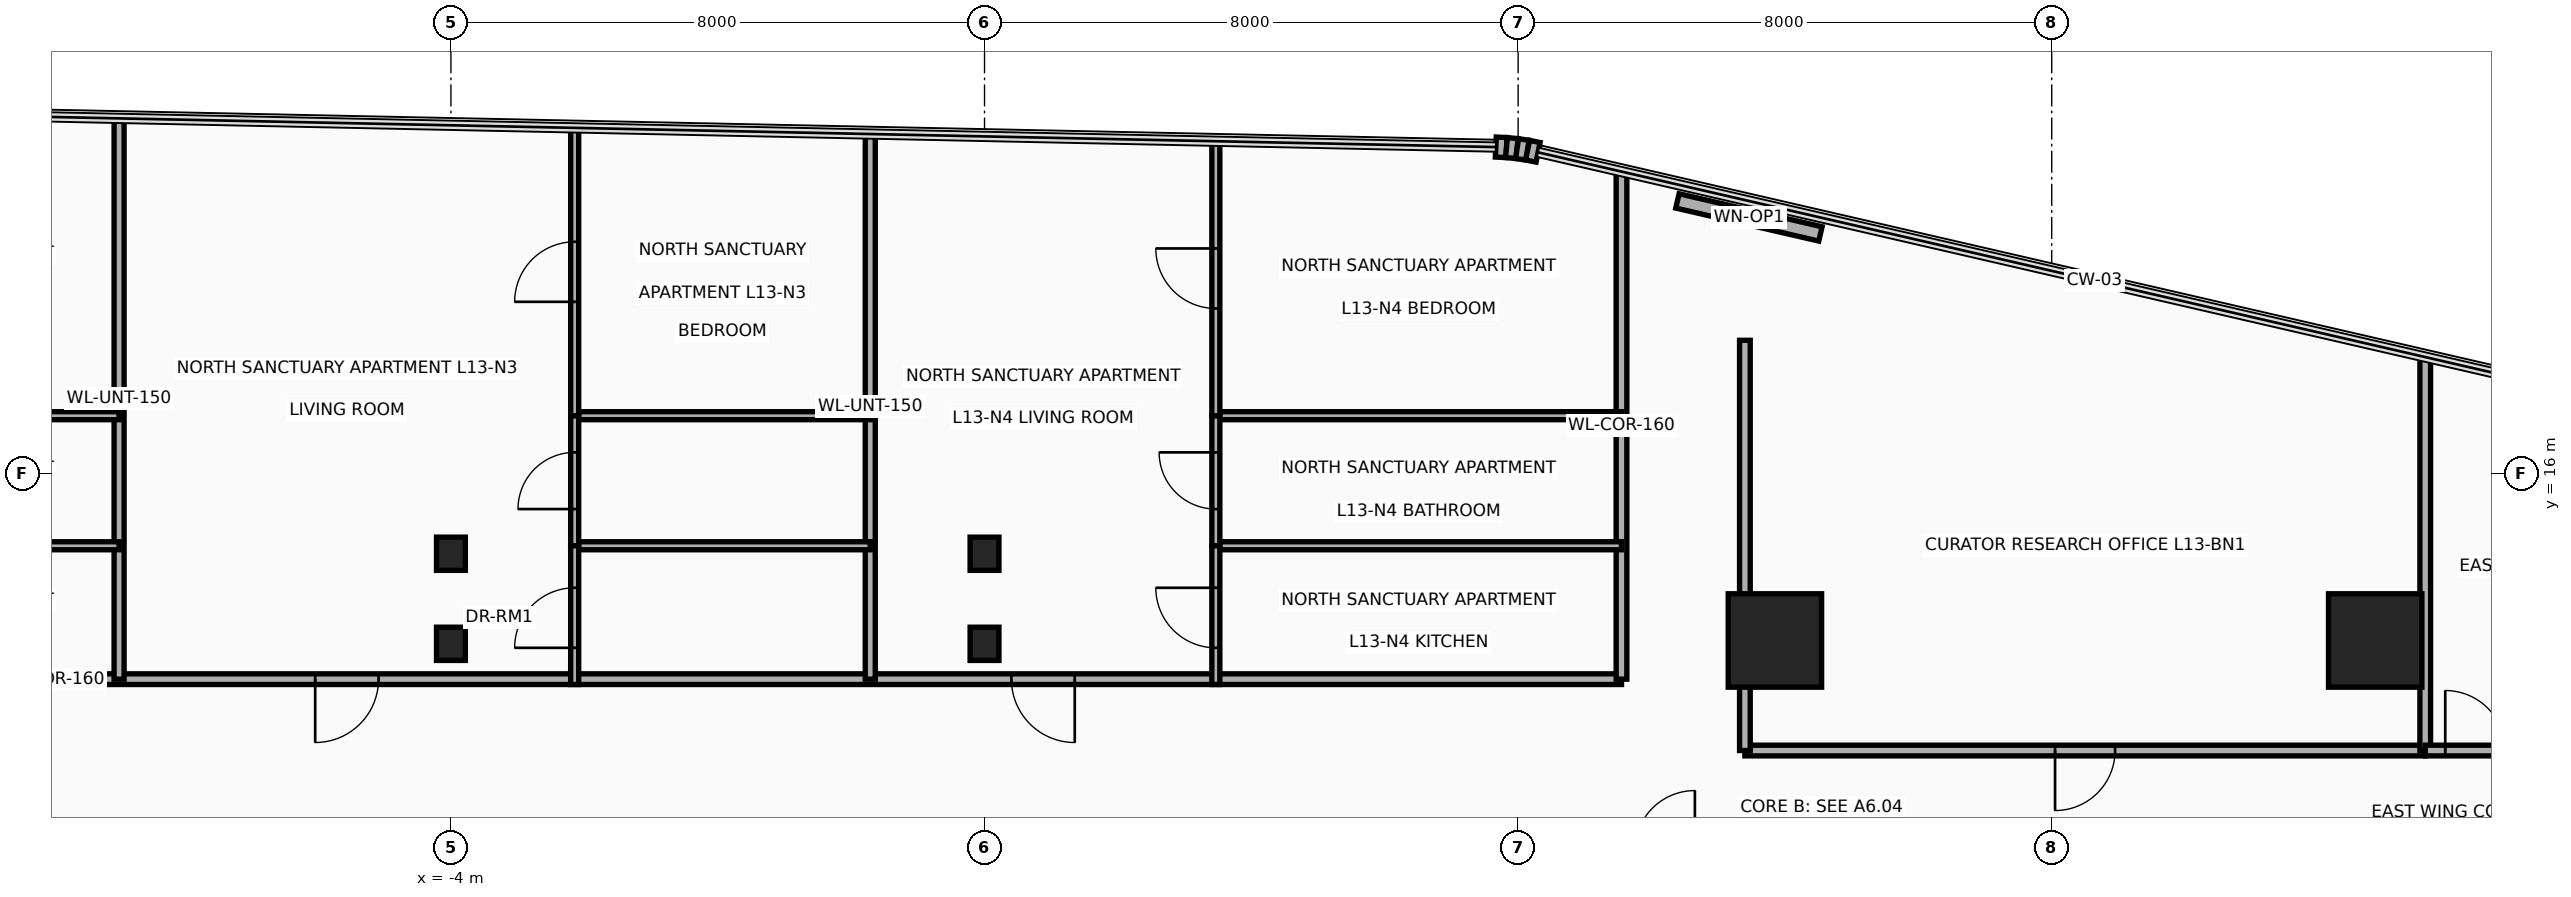
"""IFC4 building model, lengths in metres.
Left out: names, types, materials, properties, quantities, classifications, styles, units other than length and angle.
Written with IfcOpenShell. Run it as: python <this file> out.ifc"""

import sys

from ifc_helpers import new_model, si_unit, direction, frame, frame_2d, origin, origin_2d, place, context, subcontext, project, spatial, rectangle, i_section, extrude, source, transform, mapped, element, fill, save


model = new_model("IFC4")
c1 = context("Model", 3, precision=1e-05, world=origin(), true_north=direction((0.0, 1.0)))
c2 = subcontext(c1, "Body", "Model", "MODEL_VIEW")
j1 = project(units=[si_unit("LENGTHUNIT", "METRE"), si_unit("PLANEANGLEUNIT", "RADIAN")], contexts=[c1])
p1 = place(None, origin())
s1 = spatial("IfcSite", under=j1, at=p1, CompositionType="ELEMENT")
p2 = place(p1, origin())
s2 = spatial("IfcBuilding", under=s1, at=p2, CompositionType="ELEMENT")
p3 = place(p2, frame((0.0, 0.0, 55.6)))
s3 = spatial("IfcBuildingStorey", under=s2, at=p3, CompositionType="ELEMENT", Elevation=55.6)
m1 = source(origin(), c2, "Body", "SweptSolid", [
    extrude(rectangle(XDim=1.4, YDim=1.4, at=origin_2d()), origin(), (0.0, 0.0, 1.0), 3.7),
])
for number, where, z_axis, x_axis in (
    (1, (15.85, 13.5, 0.0), (0.0, 0.0, 1.0), (1.0, 0.0, 0.0)),
    (2, (24.85, 13.5, 0.0), (0.0, 0.0, 1.0), (1.0, 0.0, 0.0)),
):
    element("IfcColumn", number, at=place(p3, frame(where, z_axis=z_axis, x_axis=x_axis)), inside=s3, PredefinedType="COLUMN", context=c2, shape_type="MappedRepresentation", body=[
        mapped(m1, transform((0.0, 0.0, 0.0), x_axis=(1.0, 0.0, 0.0), y_axis=(0.0, 1.0, 0.0), z_axis=(0.0, 0.0, 1.0), scale=1.0)),
    ])
m2 = source(origin(), c2, "Body", "SweptSolid", [
    extrude(i_section(OverallWidth=0.432, OverallDepth=0.498, WebThickness=0.056, FlangeThickness=0.089, at=origin_2d()), origin(), (0.0, 0.0, 1.0), 3.7),
])
for number, where, z_axis, x_axis in (
    (3, (-4.0, 13.45, 0.0), (0.0, 0.0, 1.0), (1.0, 0.0, 0.0)),
    (4, (-4.0, 14.8, 0.0), (0.0, 0.0, 1.0), (1.0, 0.0, 0.0)),
    (5, (4.0, 13.45, 0.0), (0.0, 0.0, 1.0), (1.0, 0.0, 0.0)),
    (6, (4.0, 14.8, 0.0), (0.0, 0.0, 1.0), (1.0, 0.0, 0.0)),
):
    element("IfcColumn", number, at=place(p3, frame(where, z_axis=z_axis, x_axis=x_axis)), inside=s3, PredefinedType="COLUMN", context=c2, shape_type="MappedRepresentation", body=[
        mapped(m2, transform((0.0, 0.0, 0.0), x_axis=(1.0, 0.0, 0.0), y_axis=(0.0, 1.0, 0.0), z_axis=(0.0, 0.0, 1.0), scale=1.0)),
    ])
p4 = place(p3, frame((11.666, 20.897, 0.0), z_axis=(0.0, 0.0, 1.0), x_axis=(0.998885297239, -0.047203421059, 0.0)))
e7 = element("IfcWall", 7, at=p4, inside=s3, PredefinedType="SOLIDWALL", context=c2, shape_type="SweptSolid", body=[
    extrude(rectangle(XDim=0.16, YDim=0.3, at=frame_2d((0.08, 0.0))), origin(), (0.0, 0.0, 1.0), 3.46),
])
p5 = place(p3, frame((11.826, 20.889, 0.0), z_axis=(0.0, 0.0, 1.0), x_axis=(0.995172891136, -0.098137234257, 0.0)))
e8 = element("IfcWall", 8, at=p5, inside=s3, PredefinedType="SOLIDWALL", context=c2, shape_type="SweptSolid", body=[
    extrude(rectangle(XDim=0.159, YDim=0.3, at=frame_2d((0.08, 0.0))), origin(), (0.0, 0.0, 1.0), 3.46),
])
p6 = place(p3, frame((11.984, 20.874, 0.0), z_axis=(0.0, 0.0, 1.0), x_axis=(0.988846069207, -0.148941100486, 0.0)))
e9 = element("IfcWall", 9, at=p6, inside=s3, PredefinedType="SOLIDWALL", context=c2, shape_type="SweptSolid", body=[
    extrude(rectangle(XDim=0.159, YDim=0.3, at=frame_2d((0.08, 0.0))), origin(), (0.0, 0.0, 1.0), 3.46),
])
p7 = place(p3, frame((12.142, 20.85, 0.0), z_axis=(0.0, 0.0, 1.0), x_axis=(0.979991950448, -0.19903712482, 0.0)))
e10 = element("IfcWall", 10, at=p7, inside=s3, PredefinedType="SOLIDWALL", context=c2, shape_type="SweptSolid", body=[
    extrude(rectangle(XDim=0.161, YDim=0.3, at=frame_2d((0.08, 0.0))), origin(), (0.0, 0.0, 1.0), 3.46),
])
p8 = place(p3, frame((14.389, 20.09, 0.0), z_axis=(0.0, 0.0, 1.0), x_axis=(0.974400545997, -0.224818984875, 0.0)))
e11 = element("IfcWall", 11, at=p8, inside=s3, PredefinedType="SOLIDWALL", context=c2, shape_type="SweptSolid", body=[
    extrude(rectangle(XDim=2.2, YDim=0.22, at=frame_2d((1.1, 0.0))), origin(), (0.0, 0.0, 1.0), 3.46),
])
p9 = place(p8, frame((0.65, 0.0, 0.95)))
e12 = element("IfcOpeningElement", 12, at=p9, cuts=e11, PredefinedType="OPENING", context=c2, shape_type="SweptSolid", body=[
    extrude(rectangle(XDim=0.9, YDim=1.3, at=frame_2d((0.45, 0.65))), frame((0.0, 0.125, 0.0), z_axis=(0.0, -1.0, 0.0), x_axis=(1.0, 0.0, 0.0)), (0.0, 0.0, 1.0), 0.25),
])
p10 = place(p3, frame((-33.54, 12.92, 0.0), z_axis=(0.0, 0.0, 1.0), x_axis=(1.0, 0.0, 0.0)))
e13 = element("IfcWall", 13, at=p10, inside=s3, PredefinedType="PARTITIONING", context=c2, shape_type="SweptSolid", body=[
    extrude(rectangle(XDim=47.09, YDim=0.16, at=frame_2d((23.545, 0.0))), origin(), (0.0, 0.0, 1.0), 2.583),
])
p11 = place(p10, frame((1.92, 0.0, 0.0)))
e14 = element("IfcOpeningElement", 14, at=p11, cuts=e13, PredefinedType="OPENING", context=c2, shape_type="SweptSolid", body=[
    extrude(rectangle(XDim=0.95, YDim=2.15, at=frame_2d((0.475, 1.075))), frame((0.0, 0.095, 0.0), z_axis=(0.0, -1.0, 0.0), x_axis=(1.0, 0.0, 0.0)), (0.0, 0.0, 1.0), 0.19),
])
p12 = place(p10, frame((15.417, 0.0, 0.0)))
e15 = element("IfcOpeningElement", 15, at=p12, cuts=e13, PredefinedType="OPENING", context=c2, shape_type="SweptSolid", body=[
    extrude(rectangle(XDim=0.95, YDim=2.15, at=frame_2d((0.475, 1.075))), frame((0.0, 0.095, 0.0), z_axis=(0.0, -1.0, 0.0), x_axis=(1.0, 0.0, 0.0)), (0.0, 0.0, 1.0), 0.19),
])
p13 = place(p10, frame((27.505, 0.0, 0.0)))
e16 = element("IfcOpeningElement", 16, at=p13, cuts=e13, PredefinedType="OPENING", context=c2, shape_type="SweptSolid", body=[
    extrude(rectangle(XDim=0.95, YDim=2.15, at=frame_2d((0.475, 1.075))), frame((0.0, 0.095, 0.0), z_axis=(0.0, -1.0, 0.0), x_axis=(1.0, 0.0, 0.0)), (0.0, 0.0, 1.0), 0.19),
])
p14 = place(p10, frame((37.943, 0.0, 0.0)))
e17 = element("IfcOpeningElement", 17, at=p14, cuts=e13, PredefinedType="OPENING", context=c2, shape_type="SweptSolid", body=[
    extrude(rectangle(XDim=0.95, YDim=2.15, at=frame_2d((0.475, 1.075))), frame((0.0, 0.095, 0.0), z_axis=(0.0, -1.0, 0.0), x_axis=(1.0, 0.0, 0.0)), (0.0, 0.0, 1.0), 0.19),
])
p15 = place(p3, frame((13.55, 12.92, 0.0), z_axis=(0.0, 0.0, 1.0), x_axis=(0.0, 1.0, 0.0)))
e18 = element("IfcWall", 18, at=p15, inside=s3, PredefinedType="PARTITIONING", context=c2, shape_type="SweptSolid", body=[
    extrude(rectangle(XDim=7.609, YDim=0.16, at=frame_2d((3.805, 0.0))), origin(), (0.0, 0.0, 1.0), 2.583),
])
p16 = place(p3, frame((-8.975, 12.92, 0.0), z_axis=(0.0, 0.0, 1.0), x_axis=(0.0, 1.0, 0.0)))
e19 = element("IfcWall", 19, at=p16, inside=s3, PredefinedType="PARTITIONING", context=c2, shape_type="SweptSolid", body=[
    extrude(rectangle(XDim=8.407, YDim=0.15, at=frame_2d((4.204, 0.0))), origin(), (0.0, 0.0, 1.0), 2.583),
])
p17 = place(p3, frame((2.287, 12.92, 0.0), z_axis=(0.0, 0.0, 1.0), x_axis=(0.0, 1.0, 0.0)))
e20 = element("IfcWall", 20, at=p17, inside=s3, PredefinedType="PARTITIONING", context=c2, shape_type="SweptSolid", body=[
    extrude(rectangle(XDim=8.172, YDim=0.15, at=frame_2d((4.086, 0.0))), origin(), (0.0, 0.0, 1.0), 2.583),
])
p18 = place(p3, frame((-15.057, 14.92, 0.0), z_axis=(0.0, 0.0, 1.0), x_axis=(1.0, 0.0, 0.0)))
e21 = element("IfcWall", 21, at=p18, inside=s3, PredefinedType="PARTITIONING", context=c2, shape_type="SweptSolid", body=[
    extrude(rectangle(XDim=6.082, YDim=0.12, at=frame_2d((3.041, 0.0))), origin(), (0.0, 0.0, 1.0), 2.583),
])
p19 = place(p3, frame((-15.057, 16.87, 0.0), z_axis=(0.0, 0.0, 1.0), x_axis=(1.0, 0.0, 0.0)))
e22 = element("IfcWall", 22, at=p19, inside=s3, PredefinedType="PARTITIONING", context=c2, shape_type="SweptSolid", body=[
    extrude(rectangle(XDim=6.082, YDim=0.12, at=frame_2d((3.041, 0.0))), origin(), (0.0, 0.0, 1.0), 3.46),
])
p20 = place(p3, frame((-2.145, 14.92, 0.0), z_axis=(0.0, 0.0, 1.0), x_axis=(1.0, 0.0, 0.0)))
e23 = element("IfcWall", 23, at=p20, inside=s3, PredefinedType="PARTITIONING", context=c2, shape_type="SweptSolid", body=[
    extrude(rectangle(XDim=4.432, YDim=0.12, at=frame_2d((2.216, 0.0))), origin(), (0.0, 0.0, 1.0), 2.583),
])
p21 = place(p3, frame((-2.145, 16.87, 0.0), z_axis=(0.0, 0.0, 1.0), x_axis=(1.0, 0.0, 0.0)))
e24 = element("IfcWall", 24, at=p21, inside=s3, PredefinedType="PARTITIONING", context=c2, shape_type="SweptSolid", body=[
    extrude(rectangle(XDim=4.432, YDim=0.12, at=frame_2d((2.216, 0.0))), origin(), (0.0, 0.0, 1.0), 3.46),
])
p22 = place(p3, frame((-2.145, 14.92, 0.0), z_axis=(0.0, 0.0, 1.0), x_axis=(0.0, 1.0, 0.0)))
e25 = element("IfcWall", 25, at=p22, inside=s3, PredefinedType="PARTITIONING", context=c2, shape_type="SweptSolid", body=[
    extrude(rectangle(XDim=1.95, YDim=0.12, at=frame_2d((0.975, 0.0))), origin(), (0.0, 0.0, 1.0), 2.583),
])
p23 = place(p22, frame((0.55, 0.0, 0.0)))
e26 = element("IfcOpeningElement", 26, at=p23, cuts=e25, PredefinedType="OPENING", context=c2, shape_type="SweptSolid", body=[
    extrude(rectangle(XDim=0.85, YDim=2.1, at=frame_2d((0.425, 1.05))), frame((0.0, 0.075, 0.0), z_axis=(0.0, -1.0, 0.0), x_axis=(1.0, 0.0, 0.0)), (0.0, 0.0, 1.0), 0.15),
])
p24 = place(p3, frame((-2.145, 12.84, 0.0), z_axis=(0.0, 0.0, 1.0), x_axis=(0.0, 1.0, 0.0)))
e27 = element("IfcWall", 27, at=p24, inside=s3, PredefinedType="PARTITIONING", context=c2, shape_type="SweptSolid", body=[
    extrude(rectangle(XDim=2.08, YDim=0.12, at=frame_2d((1.04, 0.0))), origin(), (0.0, 0.0, 1.0), 2.583),
])
p25 = place(p24, frame((0.55, 0.0, 0.0)))
e28 = element("IfcOpeningElement", 28, at=p25, cuts=e27, PredefinedType="OPENING", context=c2, shape_type="SweptSolid", body=[
    extrude(rectangle(XDim=0.9, YDim=2.1, at=frame_2d((0.45, 1.05))), frame((0.0, 0.075, 0.0), z_axis=(0.0, -1.0, 0.0), x_axis=(1.0, 0.0, 0.0)), (0.0, 0.0, 1.0), 0.15),
])
p26 = place(p3, frame((-2.145, 16.87, 0.0), z_axis=(0.0, 0.0, 1.0), x_axis=(0.0, 1.0, 0.0)))
e29 = element("IfcWall", 29, at=p26, inside=s3, PredefinedType="PARTITIONING", context=c2, shape_type="SweptSolid", body=[
    extrude(rectangle(XDim=4.315, YDim=0.12, at=frame_2d((2.157, 0.0))), origin(), (0.0, 0.0, 1.0), 3.46),
])
p27 = place(p26, frame((1.707, 0.0, 0.0)))
e30 = element("IfcOpeningElement", 30, at=p27, cuts=e29, PredefinedType="OPENING", context=c2, shape_type="SweptSolid", body=[
    extrude(rectangle(XDim=0.9, YDim=2.1, at=frame_2d((0.45, 1.05))), frame((0.0, 0.075, 0.0), z_axis=(0.0, -1.0, 0.0), x_axis=(1.0, 0.0, 0.0)), (0.0, 0.0, 1.0), 0.15),
])
for number, where, z_axis, x_axis in (
    (31, (7.468, 14.92, 0.0), (0.0, 0.0, 1.0), (1.0, 0.0, 0.0)),
    (32, (7.468, 16.87, 0.0), (0.0, 0.0, 1.0), (1.0, 0.0, 0.0)),
):
    element("IfcWall", number, at=place(p3, frame(where, z_axis=z_axis, x_axis=x_axis)), inside=s3, PredefinedType="PARTITIONING", context=c2, shape_type="SweptSolid", body=[
        extrude(rectangle(XDim=6.082, YDim=0.12, at=frame_2d((3.041, 0.0))), origin(), (0.0, 0.0, 1.0), 3.46),
    ])
p28 = place(p3, frame((7.468, 14.92, 0.0), z_axis=(0.0, 0.0, 1.0), x_axis=(0.0, 1.0, 0.0)))
e33 = element("IfcWall", 33, at=p28, inside=s3, PredefinedType="PARTITIONING", context=c2, shape_type="SweptSolid", body=[
    extrude(rectangle(XDim=1.95, YDim=0.12, at=frame_2d((0.975, 0.0))), origin(), (0.0, 0.0, 1.0), 3.46),
])
p29 = place(p28, frame((0.55, 0.0, 0.0)))
e34 = element("IfcOpeningElement", 34, at=p29, cuts=e33, PredefinedType="OPENING", context=c2, shape_type="SweptSolid", body=[
    extrude(rectangle(XDim=0.85, YDim=2.1, at=frame_2d((0.425, 1.05))), frame((0.0, 0.075, 0.0), z_axis=(0.0, -1.0, 0.0), x_axis=(1.0, 0.0, 0.0)), (0.0, 0.0, 1.0), 0.15),
])
p30 = place(p3, frame((7.468, 12.84, 0.0), z_axis=(0.0, 0.0, 1.0), x_axis=(0.0, 1.0, 0.0)))
e35 = element("IfcWall", 35, at=p30, inside=s3, PredefinedType="PARTITIONING", context=c2, shape_type="SweptSolid", body=[
    extrude(rectangle(XDim=2.08, YDim=0.12, at=frame_2d((1.04, 0.0))), origin(), (0.0, 0.0, 1.0), 2.583),
])
p31 = place(p30, frame((0.55, 0.0, 0.0)))
e36 = element("IfcOpeningElement", 36, at=p31, cuts=e35, PredefinedType="OPENING", context=c2, shape_type="SweptSolid", body=[
    extrude(rectangle(XDim=0.9, YDim=2.1, at=frame_2d((0.45, 1.05))), frame((0.0, 0.075, 0.0), z_axis=(0.0, -1.0, 0.0), x_axis=(1.0, 0.0, 0.0)), (0.0, 0.0, 1.0), 0.15),
])
p32 = place(p3, frame((7.468, 16.87, 0.0), z_axis=(0.0, 0.0, 1.0), x_axis=(0.0, 1.0, 0.0)))
e37 = element("IfcWall", 37, at=p32, inside=s3, PredefinedType="PARTITIONING", context=c2, shape_type="SweptSolid", body=[
    extrude(rectangle(XDim=4.114, YDim=0.12, at=frame_2d((2.057, 0.0))), origin(), (0.0, 0.0, 1.0), 3.46),
])
p33 = place(p32, frame((1.607, 0.0, 0.0)))
e38 = element("IfcOpeningElement", 38, at=p33, cuts=e37, PredefinedType="OPENING", context=c2, shape_type="SweptSolid", body=[
    extrude(rectangle(XDim=0.9, YDim=2.1, at=frame_2d((0.45, 1.05))), frame((0.0, 0.075, 0.0), z_axis=(0.0, -1.0, 0.0), x_axis=(1.0, 0.0, 0.0)), (0.0, 0.0, 1.0), 0.15),
])
p34 = place(p3, frame((15.4, 11.85, 0.0), z_axis=(0.0, 0.0, 1.0), x_axis=(1.0, 0.0, 0.0)))
e39 = element("IfcWall", 39, at=p34, inside=s3, PredefinedType="PARTITIONING", context=c2, shape_type="SweptSolid", body=[
    extrude(rectangle(XDim=10.2, YDim=0.16, at=frame_2d((5.1, 0.0))), origin(), (0.0, 0.0, 1.0), 2.834),
])
p35 = place(p34, frame((4.65, 0.0, 0.0)))
e40 = element("IfcOpeningElement", 40, at=p35, cuts=e39, PredefinedType="OPENING", context=c2, shape_type="SweptSolid", body=[
    extrude(rectangle(XDim=0.9, YDim=2.1, at=frame_2d((0.45, 1.05))), frame((0.0, 0.095, 0.0), z_axis=(0.0, -1.0, 0.0), x_axis=(1.0, 0.0, 0.0)), (0.0, 0.0, 1.0), 0.19),
])
p36 = place(p3, frame((15.4, 11.85, 0.0), z_axis=(0.0, 0.0, 1.0), x_axis=(0.0, 1.0, 0.0)))
e41 = element("IfcWall", 41, at=p36, inside=s3, PredefinedType="PARTITIONING", context=c2, shape_type="SweptSolid", body=[
    extrude(rectangle(XDim=6.15, YDim=0.16, at=frame_2d((3.075, 0.0))), origin(), (0.0, 0.0, 1.0), 2.583),
])
p37 = place(p3, frame((25.6, 11.85, 0.0), z_axis=(0.0, 0.0, 1.0), x_axis=(0.0, 1.0, 0.0)))
e42 = element("IfcWall", 42, at=p37, inside=s3, PredefinedType="PARTITIONING", context=c2, shape_type="SweptSolid", body=[
    extrude(rectangle(XDim=5.898, YDim=0.16, at=frame_2d((2.949, 0.0))), origin(), (0.0, 0.0, 1.0), 2.583),
])
p38 = place(p3, frame((25.6, 11.85, 0.0), z_axis=(0.0, 0.0, 1.0), x_axis=(1.0, 0.0, 0.0)))
e43 = element("IfcWall", 43, at=p38, inside=s3, PredefinedType="PARTITIONING", context=c2, shape_type="SweptSolid", body=[
    extrude(rectangle(XDim=5.79, YDim=0.16, at=frame_2d((2.895, 0.0))), origin(), (0.0, 0.0, 1.0), 2.896),
])
p39 = place(p38, frame((0.3, 0.0, 0.0)))
e44 = element("IfcOpeningElement", 44, at=p39, cuts=e43, PredefinedType="OPENING", context=c2, shape_type="SweptSolid", body=[
    extrude(rectangle(XDim=0.9, YDim=2.1, at=frame_2d((0.45, 1.05))), frame((0.0, 0.095, 0.0), z_axis=(0.0, -1.0, 0.0), x_axis=(1.0, 0.0, 0.0)), (0.0, 0.0, 1.0), 0.19),
])
p40 = place(p9, origin())
e45 = element("IfcWindow", 45, at=p40, inside=s3, PartitioningType="SINGLE_PANEL", PredefinedType="WINDOW", context=c2, shape_type="SweptSolid", body=[
    extrude(rectangle(XDim=0.9, YDim=1.3, at=frame_2d((0.45, 0.65))), frame((0.0, 0.03, 0.0), z_axis=(0.0, -1.0, 0.0), x_axis=(1.0, 0.0, 0.0)), (0.0, 0.0, 1.0), 0.06),
])
fill(e12, e45)
p41 = place(p13, frame((0.95, 0.0, 0.0), z_axis=(0.0, 0.0, 1.0), x_axis=(-1.0, 0.0, 0.0)))
e46 = element("IfcDoor", 46, at=p41, inside=s3, OperationType="SINGLE_SWING_LEFT", PredefinedType="DOOR", context=c2, shape_type="SweptSolid", body=[
    extrude(rectangle(XDim=0.95, YDim=2.15, at=frame_2d((0.475, 1.075))), frame((0.0, 0.025, 0.0), z_axis=(0.0, -1.0, 0.0), x_axis=(1.0, 0.0, 0.0)), (0.0, 0.0, 1.0), 0.05),
])
fill(e16, e46)
p42 = place(p23, origin())
e47 = element("IfcDoor", 47, at=p42, inside=s3, OperationType="SINGLE_SWING_RIGHT", PredefinedType="DOOR", context=c2, shape_type="SweptSolid", body=[
    extrude(rectangle(XDim=0.85, YDim=2.1, at=frame_2d((0.425, 1.05))), frame((0.0, 0.025, 0.0), z_axis=(0.0, -1.0, 0.0), x_axis=(1.0, 0.0, 0.0)), (0.0, 0.0, 1.0), 0.05),
])
fill(e26, e47)
p43 = place(p25, origin())
e48 = element("IfcDoor", 48, at=p43, inside=s3, OperationType="SINGLE_SWING_LEFT", PredefinedType="DOOR", context=c2, shape_type="SweptSolid", body=[
    extrude(rectangle(XDim=0.9, YDim=2.1, at=frame_2d((0.45, 1.05))), frame((0.0, 0.025, 0.0), z_axis=(0.0, -1.0, 0.0), x_axis=(1.0, 0.0, 0.0)), (0.0, 0.0, 1.0), 0.05),
])
fill(e28, e48)
p44 = place(p27, origin())
e49 = element("IfcDoor", 49, at=p44, inside=s3, OperationType="SINGLE_SWING_RIGHT", PredefinedType="DOOR", context=c2, shape_type="SweptSolid", body=[
    extrude(rectangle(XDim=0.9, YDim=2.1, at=frame_2d((0.45, 1.05))), frame((0.0, 0.025, 0.0), z_axis=(0.0, -1.0, 0.0), x_axis=(1.0, 0.0, 0.0)), (0.0, 0.0, 1.0), 0.05),
])
fill(e30, e49)
p45 = place(p14, frame((0.95, 0.0, 0.0), z_axis=(0.0, 0.0, 1.0), x_axis=(-1.0, 0.0, 0.0)))
e50 = element("IfcDoor", 50, at=p45, inside=s3, OperationType="SINGLE_SWING_LEFT", PredefinedType="DOOR", context=c2, shape_type="SweptSolid", body=[
    extrude(rectangle(XDim=0.95, YDim=2.15, at=frame_2d((0.475, 1.075))), frame((0.0, 0.025, 0.0), z_axis=(0.0, -1.0, 0.0), x_axis=(1.0, 0.0, 0.0)), (0.0, 0.0, 1.0), 0.05),
])
fill(e17, e50)
p46 = place(p29, origin())
e51 = element("IfcDoor", 51, at=p46, inside=s3, OperationType="SINGLE_SWING_RIGHT", PredefinedType="DOOR", context=c2, shape_type="SweptSolid", body=[
    extrude(rectangle(XDim=0.85, YDim=2.1, at=frame_2d((0.425, 1.05))), frame((0.0, 0.025, 0.0), z_axis=(0.0, -1.0, 0.0), x_axis=(1.0, 0.0, 0.0)), (0.0, 0.0, 1.0), 0.05),
])
fill(e34, e51)
p47 = place(p31, origin())
e52 = element("IfcDoor", 52, at=p47, inside=s3, OperationType="SINGLE_SWING_LEFT", PredefinedType="DOOR", context=c2, shape_type="SweptSolid", body=[
    extrude(rectangle(XDim=0.9, YDim=2.1, at=frame_2d((0.45, 1.05))), frame((0.0, 0.025, 0.0), z_axis=(0.0, -1.0, 0.0), x_axis=(1.0, 0.0, 0.0)), (0.0, 0.0, 1.0), 0.05),
])
fill(e36, e52)
p48 = place(p33, origin())
e53 = element("IfcDoor", 53, at=p48, inside=s3, OperationType="SINGLE_SWING_RIGHT", PredefinedType="DOOR", context=c2, shape_type="SweptSolid", body=[
    extrude(rectangle(XDim=0.9, YDim=2.1, at=frame_2d((0.45, 1.05))), frame((0.0, 0.025, 0.0), z_axis=(0.0, -1.0, 0.0), x_axis=(1.0, 0.0, 0.0)), (0.0, 0.0, 1.0), 0.05),
])
fill(e38, e53)
p49 = place(p35, frame((0.9, 0.0, 0.0), z_axis=(0.0, 0.0, 1.0), x_axis=(-1.0, 0.0, 0.0)))
e54 = element("IfcDoor", 54, at=p49, inside=s3, OperationType="SINGLE_SWING_LEFT", PredefinedType="DOOR", context=c2, shape_type="SweptSolid", body=[
    extrude(rectangle(XDim=0.9, YDim=2.1, at=frame_2d((0.45, 1.05))), frame((0.0, 0.025, 0.0), z_axis=(0.0, -1.0, 0.0), x_axis=(1.0, 0.0, 0.0)), (0.0, 0.0, 1.0), 0.05),
])
fill(e40, e54)
p50 = place(p39, origin())
e55 = element("IfcDoor", 55, at=p50, inside=s3, OperationType="SINGLE_SWING_RIGHT", PredefinedType="DOOR", context=c2, shape_type="SweptSolid", body=[
    extrude(rectangle(XDim=0.9, YDim=2.1, at=frame_2d((0.45, 1.05))), frame((0.0, 0.025, 0.0), z_axis=(0.0, -1.0, 0.0), x_axis=(1.0, 0.0, 0.0)), (0.0, 0.0, 1.0), 0.05),
])
fill(e44, e55)
save(model, sys.argv[1])
